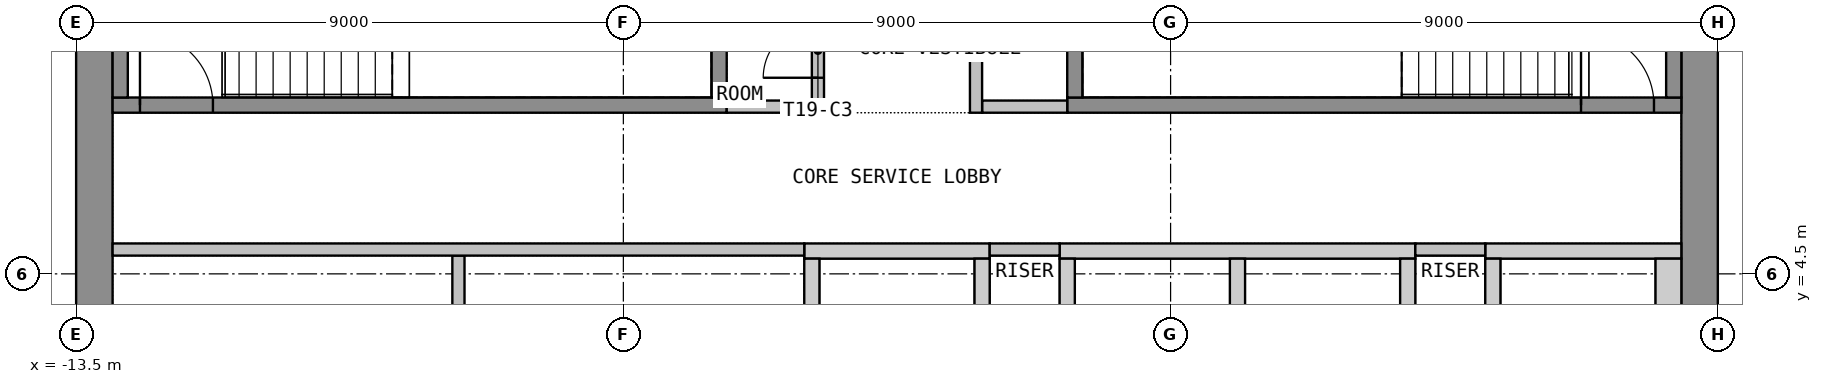
"""IFC4 building model, lengths in metres.
Left out: names, types, materials, properties, quantities, classifications, styles, units other than length and angle.
Written with IfcOpenShell. Run it as: python <this file> out.ifc"""

import sys

from ifc_helpers import new_model, si_unit, direction, frame, frame_2d, origin, place, context, subcontext, project, spatial, polyline, rectangle, outline, extrude, element, fill, save


model = new_model("IFC4")
c1 = context("Model", 3, precision=1e-05, world=origin(), true_north=direction((0.0, 1.0)))
c2 = subcontext(c1, "Body", "Model", "MODEL_VIEW")
j1 = project(units=[si_unit("LENGTHUNIT", "METRE"), si_unit("PLANEANGLEUNIT", "RADIAN")], contexts=[c1])
p1 = place(None, origin())
s1 = spatial("IfcSite", under=j1, at=p1, CompositionType="ELEMENT")
p2 = place(p1, origin())
s2 = spatial("IfcBuilding", under=s1, at=p2, CompositionType="ELEMENT")
p3 = place(p2, frame((0.0, 0.0, 258.6)))
s3 = spatial("IfcBuildingStorey", under=s2, at=p3, CompositionType="ELEMENT", Elevation=258.6)
p4 = place(p3, frame((-13.2, -10.65, 0.0), z_axis=(0.0, 0.0, 1.0), x_axis=(0.0, 1.0, 0.0)))
e1 = element("IfcWall", 1, at=p4, inside=s3, PredefinedType="SHEAR", context=c2, shape_type="SweptSolid", body=[
    extrude(rectangle(XDim=21.3, YDim=0.6, at=frame_2d((10.65, 0.0))), origin(), (0.0, 0.0, 1.0), 3.575),
])
p5 = place(p4, frame((9.45, 0.0, 0.0)))
e2 = element("IfcOpeningElement", 2, at=p5, cuts=e1, PredefinedType="OPENING", context=c2, shape_type="SweptSolid", body=[
    extrude(rectangle(XDim=2.4, YDim=2.1, at=frame_2d((1.2, 1.05))), frame((0.0, 0.31, 0.0), z_axis=(0.0, -1.0, 0.0), x_axis=(1.0, 0.0, 0.0)), (0.0, 0.0, 1.0), 0.62),
])
p6 = place(p3, frame((13.2, -10.65, 0.0), z_axis=(0.0, 0.0, 1.0), x_axis=(0.0, 1.0, 0.0)))
e3 = element("IfcWall", 3, at=p6, inside=s3, PredefinedType="SHEAR", context=c2, shape_type="SweptSolid", body=[
    extrude(rectangle(XDim=21.3, YDim=0.6, at=frame_2d((10.65, 0.0))), origin(), (0.0, 0.0, 1.0), 3.575),
])
p7 = place(p6, frame((9.45, 0.0, 0.0)))
e4 = element("IfcOpeningElement", 4, at=p7, cuts=e3, PredefinedType="OPENING", context=c2, shape_type="SweptSolid", body=[
    extrude(rectangle(XDim=2.4, YDim=2.1, at=frame_2d((1.2, 1.05))), frame((0.0, 0.31, 0.0), z_axis=(0.0, -1.0, 0.0), x_axis=(1.0, 0.0, 0.0)), (0.0, 0.0, 1.0), 0.62),
])
p8 = place(p3, origin())
e5 = element("IfcWall", 5, at=p8, inside=s3, PredefinedType="SHEAR", context=c2, shape_type="SweptSolid", body=[
    extrude(outline(polyline([(-1.525, 4.75), (1.525, 4.75), (1.525, 5.0), (-1.525, 5.0), (-1.525, 4.75)])), origin(), (0.0, 0.0, 1.0), 3.575),
])
p9 = place(p3, origin())
e6 = element("IfcWall", 6, at=p9, inside=s3, PredefinedType="SHEAR", context=c2, shape_type="SweptSolid", body=[
    extrude(outline(polyline([(2.675, 4.75), (8.525, 4.75), (8.525, 5.0), (2.675, 5.0), (2.675, 4.75)])), origin(), (0.0, 0.0, 1.0), 3.575),
])
p10 = place(p3, origin())
e7 = element("IfcWall", 7, at=p10, inside=s3, PredefinedType="SHEAR", context=c2, shape_type="SweptSolid", body=[
    extrude(outline(polyline([(9.675, 4.75), (12.9, 4.75), (12.9, 5.0), (9.675, 5.0), (9.675, 4.75)])), origin(), (0.0, 0.0, 1.0), 3.575),
])
p11 = place(p3, origin())
e8 = element("IfcWall", 8, at=p11, inside=s3, PredefinedType="SHEAR", context=c2, shape_type="SweptSolid", body=[
    extrude(outline(polyline([(-1.525, 2.05), (-1.275, 2.05), (-1.275, 4.75), (-1.525, 4.75), (-1.525, 2.05)])), origin(), (0.0, 0.0, 1.0), 3.575),
])
p12 = place(p3, origin())
e9 = element("IfcWall", 9, at=p12, inside=s3, PredefinedType="SHEAR", context=c2, shape_type="SweptSolid", body=[
    extrude(outline(polyline([(1.275, 2.05), (1.525, 2.05), (1.525, 4.75), (1.275, 4.75), (1.275, 2.05)])), origin(), (0.0, 0.0, 1.0), 3.575),
])
p13 = place(p3, origin())
e10 = element("IfcWall", 10, at=p13, inside=s3, PredefinedType="SHEAR", context=c2, shape_type="SweptSolid", body=[
    extrude(outline(polyline([(2.675, 2.05), (2.925, 2.05), (2.925, 4.75), (2.675, 4.75), (2.675, 2.05)])), origin(), (0.0, 0.0, 1.0), 3.575),
])
p14 = place(p3, origin())
e11 = element("IfcWall", 11, at=p14, inside=s3, PredefinedType="SHEAR", context=c2, shape_type="SweptSolid", body=[
    extrude(outline(polyline([(5.475, 2.05), (5.725, 2.05), (5.725, 4.75), (5.475, 4.75), (5.475, 2.05)])), origin(), (0.0, 0.0, 1.0), 3.575),
])
p15 = place(p3, origin())
e12 = element("IfcWall", 12, at=p15, inside=s3, PredefinedType="SHEAR", context=c2, shape_type="SweptSolid", body=[
    extrude(outline(polyline([(8.275, 2.05), (8.525, 2.05), (8.525, 4.75), (8.275, 4.75), (8.275, 2.05)])), origin(), (0.0, 0.0, 1.0), 3.575),
])
p16 = place(p3, origin())
e13 = element("IfcWall", 13, at=p16, inside=s3, PredefinedType="SHEAR", context=c2, shape_type="SweptSolid", body=[
    extrude(outline(polyline([(9.675, 2.05), (9.925, 2.05), (9.925, 4.75), (9.675, 4.75), (9.675, 2.05)])), origin(), (0.0, 0.0, 1.0), 3.575),
])
p17 = place(p3, origin())
e14 = element("IfcWall", 14, at=p17, inside=s3, PredefinedType="SHEAR", context=c2, shape_type="SweptSolid", body=[
    extrude(outline(polyline([(12.475, 2.05), (12.9, 2.05), (12.9, 4.75), (12.475, 4.75), (12.475, 2.05)])), origin(), (0.0, 0.0, 1.0), 3.575),
])
p18 = place(p3, frame((-12.9, 7.275, 0.0), z_axis=(0.0, 0.0, 1.0), x_axis=(1.0, 0.0, 0.0)))
e15 = element("IfcWall", 15, at=p18, inside=s3, PredefinedType="SHEAR", context=c2, shape_type="SweptSolid", body=[
    extrude(rectangle(XDim=10.1, YDim=0.25, at=frame_2d((5.05, 0.0))), origin(), (0.0, 0.0, 1.0), 3.575),
])
p19 = place(p18, frame((0.45, 0.0, 0.0)))
e16 = element("IfcOpeningElement", 16, at=p19, cuts=e15, PredefinedType="OPENING", context=c2, shape_type="SweptSolid", body=[
    extrude(rectangle(XDim=1.2, YDim=2.1, at=frame_2d((0.6, 1.05))), frame((0.0, 0.135, 0.0), z_axis=(0.0, -1.0, 0.0), x_axis=(1.0, 0.0, 0.0)), (0.0, 0.0, 1.0), 0.27),
])
for number, where, z_axis, x_axis in (
    (17, (-12.775, 7.4, 0.0), (0.0, 0.0, 1.0), (0.0, 1.0, 0.0)),
    (18, (-2.925, 7.4, 0.0), (0.0, 0.0, 1.0), (0.0, 1.0, 0.0)),
):
    element("IfcWall", number, at=place(p3, frame(where, z_axis=z_axis, x_axis=x_axis)), inside=s3, PredefinedType="SHEAR", context=c2, shape_type="SweptSolid", body=[
        extrude(rectangle(XDim=3.25, YDim=0.25, at=frame_2d((1.625, 0.0))), origin(), (0.0, 0.0, 1.0), 3.575),
    ])
p20 = place(p3, frame((2.8, 7.275, 0.0), z_axis=(0.0, 0.0, 1.0), x_axis=(1.0, 0.0, 0.0)))
e19 = element("IfcWall", 19, at=p20, inside=s3, PredefinedType="SHEAR", context=c2, shape_type="SweptSolid", body=[
    extrude(rectangle(XDim=10.1, YDim=0.25, at=frame_2d((5.05, 0.0))), origin(), (0.0, 0.0, 1.0), 3.575),
])
p21 = place(p20, frame((8.45, 0.0, 0.0)))
e20 = element("IfcOpeningElement", 20, at=p21, cuts=e19, PredefinedType="OPENING", context=c2, shape_type="SweptSolid", body=[
    extrude(rectangle(XDim=1.2, YDim=2.1, at=frame_2d((0.6, 1.05))), frame((0.0, 0.135, 0.0), z_axis=(0.0, -1.0, 0.0), x_axis=(1.0, 0.0, 0.0)), (0.0, 0.0, 1.0), 0.27),
])
for number, where, z_axis, x_axis in (
    (21, (2.925, 7.4, 0.0), (0.0, 0.0, 1.0), (0.0, 1.0, 0.0)),
    (22, (12.775, 7.4, 0.0), (0.0, 0.0, 1.0), (0.0, 1.0, 0.0)),
):
    element("IfcWall", number, at=place(p3, frame(where, z_axis=z_axis, x_axis=x_axis)), inside=s3, PredefinedType="SHEAR", context=c2, shape_type="SweptSolid", body=[
        extrude(rectangle(XDim=3.25, YDim=0.25, at=frame_2d((1.625, 0.0))), origin(), (0.0, 0.0, 1.0), 3.575),
    ])
for number, where, z_axis, x_axis in (
    (23, (-2.8, 7.25, 0.0), (0.0, 0.0, 1.0), (1.0, 0.0, 0.0)),
    (24, (1.4, 7.25, 0.0), (0.0, 0.0, 1.0), (1.0, 0.0, 0.0)),
):
    element("IfcWall", number, at=place(p3, frame(where, z_axis=z_axis, x_axis=x_axis)), inside=s3, PredefinedType="PARTITIONING", context=c2, shape_type="SweptSolid", body=[
        extrude(rectangle(XDim=1.4, YDim=0.2, at=frame_2d((0.7, 0.0))), origin(), (0.0, 0.0, 1.0), 3.575),
    ])
p22 = place(p3, frame((-1.3, 7.15, 0.0), z_axis=(0.0, 0.0, 1.0), x_axis=(0.0, 1.0, 0.0)))
e25 = element("IfcWall", 25, at=p22, inside=s3, PredefinedType="PARTITIONING", context=c2, shape_type="SweptSolid", body=[
    extrude(rectangle(XDim=3.5, YDim=0.2, at=frame_2d((1.75, 0.0))), origin(), (0.0, 0.0, 1.0), 3.575),
])
p23 = place(p22, frame((0.575, 0.0, 0.0)))
e26 = element("IfcOpeningElement", 26, at=p23, cuts=e25, PredefinedType="OPENING", context=c2, shape_type="SweptSolid", body=[
    extrude(rectangle(XDim=0.9, YDim=2.1, at=frame_2d((0.45, 1.05))), frame((0.0, 0.11, 0.0), z_axis=(0.0, -1.0, 0.0), x_axis=(1.0, 0.0, 0.0)), (0.0, 0.0, 1.0), 0.22),
])
p24 = place(p22, frame((2.225, 0.0, 0.0)))
e27 = element("IfcOpeningElement", 27, at=p24, cuts=e25, PredefinedType="OPENING", context=c2, shape_type="SweptSolid", body=[
    extrude(rectangle(XDim=0.9, YDim=2.1, at=frame_2d((0.45, 1.05))), frame((0.0, 0.11, 0.0), z_axis=(0.0, -1.0, 0.0), x_axis=(1.0, 0.0, 0.0)), (0.0, 0.0, 1.0), 0.22),
])
p25 = place(p3, frame((1.3, 7.15, 0.0), z_axis=(0.0, 0.0, 1.0), x_axis=(0.0, 1.0, 0.0)))
e28 = element("IfcWall", 28, at=p25, inside=s3, PredefinedType="PARTITIONING", context=c2, shape_type="SweptSolid", body=[
    extrude(rectangle(XDim=3.5, YDim=0.2, at=frame_2d((1.75, 0.0))), origin(), (0.0, 0.0, 1.0), 3.575),
])
p26 = place(p25, frame((1.4, 0.0, 0.0)))
e29 = element("IfcOpeningElement", 29, at=p26, cuts=e28, PredefinedType="OPENING", context=c2, shape_type="SweptSolid", body=[
    extrude(rectangle(XDim=0.9, YDim=2.1, at=frame_2d((0.45, 1.05))), frame((0.0, 0.11, 0.0), z_axis=(0.0, -1.0, 0.0), x_axis=(1.0, 0.0, 0.0)), (0.0, 0.0, 1.0), 0.22),
])
p27 = place(p3, frame((-7.212, 2.0, 0.0), z_axis=(0.0, 0.0, 1.0), x_axis=(0.0, 1.0, 0.0)))
e30 = element("IfcWall", 30, at=p27, inside=s3, PredefinedType="PARTITIONING", context=c2, shape_type="SweptSolid", body=[
    extrude(rectangle(XDim=2.8, YDim=0.2, at=frame_2d((1.4, 0.0))), origin(), (0.0, 0.0, 1.0), 3.575),
])
p28 = place(p3, frame((-12.9, 4.9, 0.0), z_axis=(0.0, 0.0, 1.0), x_axis=(1.0, 0.0, 0.0)))
e31 = element("IfcWall", 31, at=p28, inside=s3, PredefinedType="PARTITIONING", context=c2, shape_type="SweptSolid", body=[
    extrude(rectangle(XDim=11.375, YDim=0.2, at=frame_2d((5.688, 0.0))), origin(), (0.0, 0.0, 1.0), 3.575),
])
for number, where, z_axis, x_axis in (
    (32, (1.525, 4.9, 0.0), (0.0, 0.0, 1.0), (1.0, 0.0, 0.0)),
    (33, (8.525, 4.9, 0.0), (0.0, 0.0, 1.0), (1.0, 0.0, 0.0)),
):
    element("IfcWall", number, at=place(p3, frame(where, z_axis=z_axis, x_axis=x_axis)), inside=s3, PredefinedType="PARTITIONING", context=c2, shape_type="SweptSolid", body=[
        extrude(rectangle(XDim=1.15, YDim=0.2, at=frame_2d((0.575, 0.0))), origin(), (0.0, 0.0, 1.0), 3.575),
    ])
p29 = place(p19, origin())
e34 = element("IfcDoor", 34, at=p29, inside=s3, OperationType="SINGLE_SWING_LEFT", PredefinedType="DOOR", context=c2, shape_type="SweptSolid", body=[
    extrude(rectangle(XDim=1.2, YDim=2.1, at=frame_2d((0.6, 1.05))), frame((0.0, 0.025, 0.0), z_axis=(0.0, -1.0, 0.0), x_axis=(1.0, 0.0, 0.0)), (0.0, 0.0, 1.0), 0.05),
])
fill(e16, e34)
p30 = place(p21, origin())
e35 = element("IfcDoor", 35, at=p30, inside=s3, OperationType="SINGLE_SWING_LEFT", PredefinedType="DOOR", context=c2, shape_type="SweptSolid", body=[
    extrude(rectangle(XDim=1.2, YDim=2.1, at=frame_2d((0.6, 1.05))), frame((0.0, 0.025, 0.0), z_axis=(0.0, -1.0, 0.0), x_axis=(1.0, 0.0, 0.0)), (0.0, 0.0, 1.0), 0.05),
])
fill(e20, e35)
p31 = place(p23, origin())
e36 = element("IfcDoor", 36, at=p31, inside=s3, OperationType="SINGLE_SWING_LEFT", PredefinedType="DOOR", context=c2, shape_type="SweptSolid", body=[
    extrude(rectangle(XDim=0.9, YDim=2.1, at=frame_2d((0.45, 1.05))), frame((0.0, 0.025, 0.0), z_axis=(0.0, -1.0, 0.0), x_axis=(1.0, 0.0, 0.0)), (0.0, 0.0, 1.0), 0.05),
])
fill(e26, e36)
save(model, sys.argv[1])
